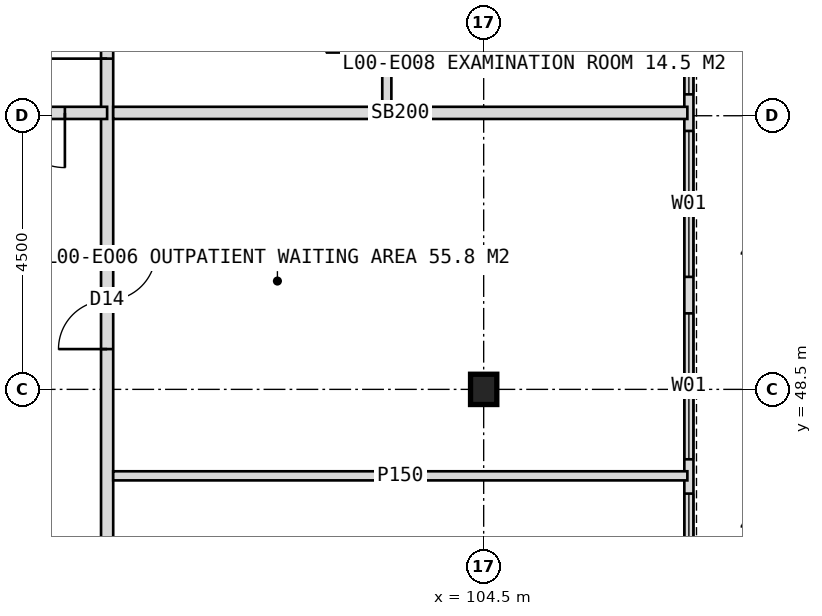
"""IFC4 building model, lengths in metres.
Left out: names, types, materials, properties, quantities, classifications, styles, units other than length and angle.
Written with IfcOpenShell. Run it as: python <this file> out.ifc"""

import sys

from ifc_helpers import new_model, si_unit, direction, frame, frame_2d, origin, origin_2d, place, context, subcontext, project, spatial, rectangle, i_section, extrude, element, fill, save


model = new_model("IFC4")
c1 = context("Model", 3, precision=1e-05, world=origin(), true_north=direction((0.0, 1.0)))
c2 = subcontext(c1, "Body", "Model", "MODEL_VIEW")
j1 = project(units=[si_unit("LENGTHUNIT", "METRE"), si_unit("PLANEANGLEUNIT", "RADIAN")], contexts=[c1])
p1 = place(None, origin())
s1 = spatial("IfcSite", under=j1, at=p1, CompositionType="ELEMENT")
p2 = place(p1, origin())
s2 = spatial("IfcBuilding", under=s1, at=p2, CompositionType="ELEMENT")
p3 = place(p2, origin())
s3 = spatial("IfcBuildingStorey", under=s2, at=p3, CompositionType="ELEMENT", Elevation=0.0)
p4 = place(p3, frame((104.5, 48.5, 0.0), z_axis=(0.0, 0.0, 1.0), x_axis=(1.0, 0.0, 0.0)))
e1 = element("IfcColumn", 1, at=p4, inside=s3, PredefinedType="COLUMN", context=c2, shape_type="SweptSolid", body=[
    extrude(i_section(OverallWidth=0.432, OverallDepth=0.498, WebThickness=0.056, FlangeThickness=0.089, FilletRadius=0.015, at=origin_2d()), origin(), (0.0, 0.0, 1.0), 6.0),
])
p5 = place(p3, frame((107.875, 38.125, 0.0), z_axis=(0.0, 0.0, 1.0), x_axis=(0.0, 1.0, 0.0)))
e2 = element("IfcWall", 2, at=p5, inside=s3, PredefinedType="STANDARD", context=c2, shape_type="SweptSolid", body=[
    extrude(rectangle(XDim=47.75, YDim=0.15, at=frame_2d((23.875, 0.0))), origin(), (0.0, 0.0, 1.0), 6.0),
])
p6 = place(p5, frame((22.7, 0.0, 0.0)))
e3 = element("IfcOpeningElement", 3, at=p6, cuts=e2, PredefinedType="OPENING", context=c2, shape_type="SweptSolid", body=[
    extrude(rectangle(XDim=2.4, YDim=2.6, at=frame_2d((1.2, 1.3))), frame((0.0, 0.085, 0.0), z_axis=(0.0, -1.0, 0.0), x_axis=(1.0, 0.0, 0.0)), (0.0, 0.0, 1.0), 0.17),
])
p7 = place(p5, frame((0.33, 0.0, 0.6)))
e4 = element("IfcOpeningElement", 4, at=p7, cuts=e2, PredefinedType="OPENING", context=c2, shape_type="SweptSolid", body=[
    extrude(rectangle(XDim=2.4, YDim=3.0, at=frame_2d((1.2, 1.5))), frame((0.0, 0.085, 0.0), z_axis=(0.0, -1.0, 0.0), x_axis=(1.0, 0.0, 0.0)), (0.0, 0.0, 1.0), 0.17),
])
p8 = place(p5, frame((3.277, 0.0, 0.6)))
e5 = element("IfcOpeningElement", 5, at=p8, cuts=e2, PredefinedType="OPENING", context=c2, shape_type="SweptSolid", body=[
    extrude(rectangle(XDim=2.4, YDim=3.0, at=frame_2d((1.2, 1.5))), frame((0.0, 0.085, 0.0), z_axis=(0.0, -1.0, 0.0), x_axis=(1.0, 0.0, 0.0)), (0.0, 0.0, 1.0), 0.17),
])
p9 = place(p5, frame((6.261, 0.0, 0.6)))
e6 = element("IfcOpeningElement", 6, at=p9, cuts=e2, PredefinedType="OPENING", context=c2, shape_type="SweptSolid", body=[
    extrude(rectangle(XDim=2.4, YDim=3.0, at=frame_2d((1.2, 1.5))), frame((0.0, 0.085, 0.0), z_axis=(0.0, -1.0, 0.0), x_axis=(1.0, 0.0, 0.0)), (0.0, 0.0, 1.0), 0.17),
])
p10 = place(p5, frame((9.225, 0.0, 0.6)))
e7 = element("IfcOpeningElement", 7, at=p10, cuts=e2, PredefinedType="OPENING", context=c2, shape_type="SweptSolid", body=[
    extrude(rectangle(XDim=2.4, YDim=3.0, at=frame_2d((1.2, 1.5))), frame((0.0, 0.085, 0.0), z_axis=(0.0, -1.0, 0.0), x_axis=(1.0, 0.0, 0.0)), (0.0, 0.0, 1.0), 0.17),
])
p11 = place(p5, frame((12.225, 0.0, 0.6)))
e8 = element("IfcOpeningElement", 8, at=p11, cuts=e2, PredefinedType="OPENING", context=c2, shape_type="SweptSolid", body=[
    extrude(rectangle(XDim=2.4, YDim=3.0, at=frame_2d((1.2, 1.5))), frame((0.0, 0.085, 0.0), z_axis=(0.0, -1.0, 0.0), x_axis=(1.0, 0.0, 0.0)), (0.0, 0.0, 1.0), 0.17),
])
p12 = place(p5, frame((15.227, 0.0, 0.6)))
e9 = element("IfcOpeningElement", 9, at=p12, cuts=e2, PredefinedType="OPENING", context=c2, shape_type="SweptSolid", body=[
    extrude(rectangle(XDim=2.4, YDim=3.0, at=frame_2d((1.2, 1.5))), frame((0.0, 0.085, 0.0), z_axis=(0.0, -1.0, 0.0), x_axis=(1.0, 0.0, 0.0)), (0.0, 0.0, 1.0), 0.17),
])
p13 = place(p5, frame((18.198, 0.0, 0.6)))
e10 = element("IfcOpeningElement", 10, at=p13, cuts=e2, PredefinedType="OPENING", context=c2, shape_type="SweptSolid", body=[
    extrude(rectangle(XDim=2.4, YDim=3.0, at=frame_2d((1.2, 1.5))), frame((0.0, 0.085, 0.0), z_axis=(0.0, -1.0, 0.0), x_axis=(1.0, 0.0, 0.0)), (0.0, 0.0, 1.0), 0.17),
])
p14 = place(p5, frame((27.152, 0.0, 0.6)))
e11 = element("IfcOpeningElement", 11, at=p14, cuts=e2, PredefinedType="OPENING", context=c2, shape_type="SweptSolid", body=[
    extrude(rectangle(XDim=2.4, YDim=3.0, at=frame_2d((1.2, 1.5))), frame((0.0, 0.085, 0.0), z_axis=(0.0, -1.0, 0.0), x_axis=(1.0, 0.0, 0.0)), (0.0, 0.0, 1.0), 0.17),
])
p15 = place(p5, frame((30.136, 0.0, 0.6)))
e12 = element("IfcOpeningElement", 12, at=p15, cuts=e2, PredefinedType="OPENING", context=c2, shape_type="SweptSolid", body=[
    extrude(rectangle(XDim=2.4, YDim=3.0, at=frame_2d((1.2, 1.5))), frame((0.0, 0.085, 0.0), z_axis=(0.0, -1.0, 0.0), x_axis=(1.0, 0.0, 0.0)), (0.0, 0.0, 1.0), 0.17),
])
p16 = place(p5, frame((33.12, 0.0, 0.6)))
e13 = element("IfcOpeningElement", 13, at=p16, cuts=e2, PredefinedType="OPENING", context=c2, shape_type="SweptSolid", body=[
    extrude(rectangle(XDim=2.4, YDim=3.0, at=frame_2d((1.2, 1.5))), frame((0.0, 0.085, 0.0), z_axis=(0.0, -1.0, 0.0), x_axis=(1.0, 0.0, 0.0)), (0.0, 0.0, 1.0), 0.17),
])
p17 = place(p5, frame((36.044, 0.0, 0.6)))
e14 = element("IfcOpeningElement", 14, at=p17, cuts=e2, PredefinedType="OPENING", context=c2, shape_type="SweptSolid", body=[
    extrude(rectangle(XDim=2.4, YDim=3.0, at=frame_2d((1.2, 1.5))), frame((0.0, 0.085, 0.0), z_axis=(0.0, -1.0, 0.0), x_axis=(1.0, 0.0, 0.0)), (0.0, 0.0, 1.0), 0.17),
])
p18 = place(p5, frame((39.044, 0.0, 0.6)))
e15 = element("IfcOpeningElement", 15, at=p18, cuts=e2, PredefinedType="OPENING", context=c2, shape_type="SweptSolid", body=[
    extrude(rectangle(XDim=2.4, YDim=3.0, at=frame_2d((1.2, 1.5))), frame((0.0, 0.085, 0.0), z_axis=(0.0, -1.0, 0.0), x_axis=(1.0, 0.0, 0.0)), (0.0, 0.0, 1.0), 0.17),
])
p19 = place(p5, frame((42.044, 0.0, 0.6)))
e16 = element("IfcOpeningElement", 16, at=p19, cuts=e2, PredefinedType="OPENING", context=c2, shape_type="SweptSolid", body=[
    extrude(rectangle(XDim=2.4, YDim=3.0, at=frame_2d((1.2, 1.5))), frame((0.0, 0.085, 0.0), z_axis=(0.0, -1.0, 0.0), x_axis=(1.0, 0.0, 0.0)), (0.0, 0.0, 1.0), 0.17),
])
p20 = place(p5, frame((45.044, 0.0, 0.6)))
e17 = element("IfcOpeningElement", 17, at=p20, cuts=e2, PredefinedType="OPENING", context=c2, shape_type="SweptSolid", body=[
    extrude(rectangle(XDim=2.4, YDim=3.0, at=frame_2d((1.2, 1.5))), frame((0.0, 0.085, 0.0), z_axis=(0.0, -1.0, 0.0), x_axis=(1.0, 0.0, 0.0)), (0.0, 0.0, 1.0), 0.17),
])
p21 = place(p3, frame((98.307, 38.15, 0.0), z_axis=(0.0, 0.0, 1.0), x_axis=(0.0, 1.0, 0.0)))
e18 = element("IfcWall", 18, at=p21, inside=s3, PredefinedType="PARTITIONING", context=c2, shape_type="SweptSolid", body=[
    extrude(rectangle(XDim=47.7, YDim=0.2, at=frame_2d((23.85, 0.0))), origin(), (0.0, 0.0, 1.0), 5.7),
])
p22 = place(p21, frame((45.7, 0.0, 0.0)))
e19 = element("IfcOpeningElement", 19, at=p22, cuts=e18, PredefinedType="OPENING", context=c2, shape_type="SweptSolid", body=[
    extrude(rectangle(XDim=1.2, YDim=2.1, at=frame_2d((0.6, 1.05))), frame((0.0, 0.11, 0.0), z_axis=(0.0, -1.0, 0.0), x_axis=(1.0, 0.0, 0.0)), (0.0, 0.0, 1.0), 0.22),
])
p23 = place(p21, frame((36.244, 0.0, 0.0)))
e20 = element("IfcOpeningElement", 20, at=p23, cuts=e18, PredefinedType="OPENING", context=c2, shape_type="SweptSolid", body=[
    extrude(rectangle(XDim=1.0, YDim=2.1, at=frame_2d((0.5, 1.05))), frame((0.0, 0.11, 0.0), z_axis=(0.0, -1.0, 0.0), x_axis=(1.0, 0.0, 0.0)), (0.0, 0.0, 1.0), 0.22),
])
p24 = place(p21, frame((0.93, 0.0, 0.0)))
e21 = element("IfcOpeningElement", 21, at=p24, cuts=e18, PredefinedType="OPENING", context=c2, shape_type="SweptSolid", body=[
    extrude(rectangle(XDim=1.0, YDim=2.1, at=frame_2d((0.5, 1.05))), frame((0.0, 0.11, 0.0), z_axis=(0.0, -1.0, 0.0), x_axis=(1.0, 0.0, 0.0)), (0.0, 0.0, 1.0), 0.22),
])
p25 = place(p21, frame((3.852, 0.0, 0.0)))
e22 = element("IfcOpeningElement", 22, at=p25, cuts=e18, PredefinedType="OPENING", context=c2, shape_type="SweptSolid", body=[
    extrude(rectangle(XDim=1.0, YDim=2.1, at=frame_2d((0.5, 1.05))), frame((0.0, 0.11, 0.0), z_axis=(0.0, -1.0, 0.0), x_axis=(1.0, 0.0, 0.0)), (0.0, 0.0, 1.0), 0.22),
])
p26 = place(p21, frame((6.836, 0.0, 0.0)))
e23 = element("IfcOpeningElement", 23, at=p26, cuts=e18, PredefinedType="OPENING", context=c2, shape_type="SweptSolid", body=[
    extrude(rectangle(XDim=1.0, YDim=2.1, at=frame_2d((0.5, 1.05))), frame((0.0, 0.11, 0.0), z_axis=(0.0, -1.0, 0.0), x_axis=(1.0, 0.0, 0.0)), (0.0, 0.0, 1.0), 0.22),
])
p27 = place(p21, frame((11.012, 0.0, 0.0)))
e24 = element("IfcOpeningElement", 24, at=p27, cuts=e18, PredefinedType="OPENING", context=c2, shape_type="SweptSolid", body=[
    extrude(rectangle(XDim=1.6, YDim=2.2, at=frame_2d((0.8, 1.1))), frame((0.0, 0.11, 0.0), z_axis=(0.0, -1.0, 0.0), x_axis=(1.0, 0.0, 0.0)), (0.0, 0.0, 1.0), 0.22),
])
p28 = place(p21, frame((15.789, 0.0, 0.0)))
e25 = element("IfcOpeningElement", 25, at=p28, cuts=e18, PredefinedType="OPENING", context=c2, shape_type="SweptSolid", body=[
    extrude(rectangle(XDim=1.0, YDim=2.1, at=frame_2d((0.5, 1.05))), frame((0.0, 0.11, 0.0), z_axis=(0.0, -1.0, 0.0), x_axis=(1.0, 0.0, 0.0)), (0.0, 0.0, 1.0), 0.22),
])
p29 = place(p21, frame((18.773, 0.0, 0.0)))
e26 = element("IfcOpeningElement", 26, at=p29, cuts=e18, PredefinedType="OPENING", context=c2, shape_type="SweptSolid", body=[
    extrude(rectangle(XDim=1.0, YDim=2.1, at=frame_2d((0.5, 1.05))), frame((0.0, 0.11, 0.0), z_axis=(0.0, -1.0, 0.0), x_axis=(1.0, 0.0, 0.0)), (0.0, 0.0, 1.0), 0.22),
])
p30 = place(p21, frame((22.95, 0.0, 0.0)))
e27 = element("IfcOpeningElement", 27, at=p30, cuts=e18, PredefinedType="OPENING", context=c2, shape_type="SweptSolid", body=[
    extrude(rectangle(XDim=1.6, YDim=2.2, at=frame_2d((0.8, 1.1))), frame((0.0, 0.11, 0.0), z_axis=(0.0, -1.0, 0.0), x_axis=(1.0, 0.0, 0.0)), (0.0, 0.0, 1.0), 0.22),
])
p31 = place(p21, frame((27.727, 0.0, 0.0)))
e28 = element("IfcOpeningElement", 28, at=p31, cuts=e18, PredefinedType="OPENING", context=c2, shape_type="SweptSolid", body=[
    extrude(rectangle(XDim=1.0, YDim=2.1, at=frame_2d((0.5, 1.05))), frame((0.0, 0.11, 0.0), z_axis=(0.0, -1.0, 0.0), x_axis=(1.0, 0.0, 0.0)), (0.0, 0.0, 1.0), 0.22),
])
p32 = place(p21, frame((30.711, 0.0, 0.0)))
e29 = element("IfcOpeningElement", 29, at=p32, cuts=e18, PredefinedType="OPENING", context=c2, shape_type="SweptSolid", body=[
    extrude(rectangle(XDim=1.0, YDim=2.1, at=frame_2d((0.5, 1.05))), frame((0.0, 0.11, 0.0), z_axis=(0.0, -1.0, 0.0), x_axis=(1.0, 0.0, 0.0)), (0.0, 0.0, 1.0), 0.22),
])
p33 = place(p21, frame((33.695, 0.0, 0.0)))
e30 = element("IfcOpeningElement", 30, at=p33, cuts=e18, PredefinedType="OPENING", context=c2, shape_type="SweptSolid", body=[
    extrude(rectangle(XDim=1.0, YDim=2.1, at=frame_2d((0.5, 1.05))), frame((0.0, 0.11, 0.0), z_axis=(0.0, -1.0, 0.0), x_axis=(1.0, 0.0, 0.0)), (0.0, 0.0, 1.0), 0.22),
])
p34 = place(p3, frame((98.307, 53.047, 0.0), z_axis=(0.0, 0.0, 1.0), x_axis=(-1.0, 0.0, 0.0)))
e31 = element("IfcWall", 31, at=p34, inside=s3, PredefinedType="SOLIDWALL", context=c2, shape_type="SweptSolid", body=[
    extrude(rectangle(XDim=3.189, YDim=0.2, at=frame_2d((1.594, 0.0))), origin(), (0.0, 0.0, 1.0), 5.7),
])
p35 = place(p34, frame((0.695, 0.0, 0.0)))
e32 = element("IfcOpeningElement", 32, at=p35, cuts=e31, PredefinedType="OPENING", context=c2, shape_type="SweptSolid", body=[
    extrude(rectangle(XDim=1.8, YDim=2.2, at=frame_2d((0.9, 1.1))), frame((0.0, 0.11, 0.0), z_axis=(0.0, -1.0, 0.0), x_axis=(1.0, 0.0, 0.0)), (0.0, 0.0, 1.0), 0.22),
])
p36 = place(p3, frame((107.85, 47.078, 0.0), z_axis=(0.0, 0.0, 1.0), x_axis=(-1.0, 0.0, 0.0)))
e33 = element("IfcWall", 33, at=p36, inside=s3, PredefinedType="PARTITIONING", context=c2, shape_type="SweptSolid", body=[
    extrude(rectangle(XDim=9.443, YDim=0.15, at=frame_2d((4.722, 0.0))), origin(), (0.0, 0.0, 1.0), 5.7),
])
p37 = place(p3, frame((107.85, 53.047, 0.0), z_axis=(0.0, 0.0, 1.0), x_axis=(-1.0, 0.0, 0.0)))
e34 = element("IfcWall", 34, at=p37, inside=s3, PredefinedType="SOLIDWALL", context=c2, shape_type="SweptSolid", body=[
    extrude(rectangle(XDim=9.443, YDim=0.2, at=frame_2d((4.722, 0.0))), origin(), (0.0, 0.0, 1.0), 5.7),
])
p38 = place(p3, frame((102.907, 53.047, 0.0), z_axis=(0.0, 0.0, 1.0), x_axis=(0.0, 1.0, 0.0)))
e35 = element("IfcWall", 35, at=p38, inside=s3, PredefinedType="PARTITIONING", context=c2, shape_type="SweptSolid", body=[
    extrude(rectangle(XDim=5.969, YDim=0.15, at=frame_2d((2.984, 0.0))), origin(), (0.0, 0.0, 1.0), 5.7),
])
p39 = place(p38, frame((0.992, 0.0, 0.0)))
e36 = element("IfcOpeningElement", 36, at=p39, cuts=e35, PredefinedType="OPENING", context=c2, shape_type="SweptSolid", body=[
    extrude(rectangle(XDim=1.0, YDim=2.1, at=frame_2d((0.5, 1.05))), frame((0.0, 0.085, 0.0), z_axis=(0.0, -1.0, 0.0), x_axis=(1.0, 0.0, 0.0)), (0.0, 0.0, 1.0), 0.17),
])
p40 = place(p38, frame((3.977, 0.0, 0.0)))
e37 = element("IfcOpeningElement", 37, at=p40, cuts=e35, PredefinedType="OPENING", context=c2, shape_type="SweptSolid", body=[
    extrude(rectangle(XDim=1.0, YDim=2.1, at=frame_2d((0.5, 1.05))), frame((0.0, 0.085, 0.0), z_axis=(0.0, -1.0, 0.0), x_axis=(1.0, 0.0, 0.0)), (0.0, 0.0, 1.0), 0.17),
])
p41 = place(p9, origin())
e38 = element("IfcWindow", 38, at=p41, inside=s3, PartitioningType="SINGLE_PANEL", PredefinedType="WINDOW", context=c2, shape_type="SweptSolid", body=[
    extrude(rectangle(XDim=2.4, YDim=3.0, at=frame_2d((1.2, 1.5))), frame((0.0, 0.03, 0.0), z_axis=(0.0, -1.0, 0.0), x_axis=(1.0, 0.0, 0.0)), (0.0, 0.0, 1.0), 0.06),
])
fill(e6, e38)
p42 = place(p10, origin())
e39 = element("IfcWindow", 39, at=p42, inside=s3, PartitioningType="SINGLE_PANEL", PredefinedType="WINDOW", context=c2, shape_type="SweptSolid", body=[
    extrude(rectangle(XDim=2.4, YDim=3.0, at=frame_2d((1.2, 1.5))), frame((0.0, 0.03, 0.0), z_axis=(0.0, -1.0, 0.0), x_axis=(1.0, 0.0, 0.0)), (0.0, 0.0, 1.0), 0.06),
])
fill(e7, e39)
p43 = place(p11, origin())
e40 = element("IfcWindow", 40, at=p43, inside=s3, PartitioningType="SINGLE_PANEL", PredefinedType="WINDOW", context=c2, shape_type="SweptSolid", body=[
    extrude(rectangle(XDim=2.4, YDim=3.0, at=frame_2d((1.2, 1.5))), frame((0.0, 0.03, 0.0), z_axis=(0.0, -1.0, 0.0), x_axis=(1.0, 0.0, 0.0)), (0.0, 0.0, 1.0), 0.06),
])
fill(e8, e40)
p44 = place(p12, origin())
e41 = element("IfcWindow", 41, at=p44, inside=s3, PartitioningType="SINGLE_PANEL", PredefinedType="WINDOW", context=c2, shape_type="SweptSolid", body=[
    extrude(rectangle(XDim=2.4, YDim=3.0, at=frame_2d((1.2, 1.5))), frame((0.0, 0.03, 0.0), z_axis=(0.0, -1.0, 0.0), x_axis=(1.0, 0.0, 0.0)), (0.0, 0.0, 1.0), 0.06),
])
fill(e9, e41)
p45 = place(p35, origin())
e42 = element("IfcDoor", 42, at=p45, inside=s3, OperationType="DOUBLE_DOOR_DOUBLE_SWING", PredefinedType="DOOR", context=c2, shape_type="SweptSolid", body=[
    extrude(rectangle(XDim=1.8, YDim=2.2, at=frame_2d((0.9, 1.1))), frame((0.0, 0.025, 0.0), z_axis=(0.0, -1.0, 0.0), x_axis=(1.0, 0.0, 0.0)), (0.0, 0.0, 1.0), 0.05),
])
fill(e32, e42)
p46 = place(p27, origin())
e43 = element("IfcDoor", 43, at=p46, inside=s3, OperationType="DOUBLE_DOOR_DOUBLE_SWING", PredefinedType="DOOR", context=c2, shape_type="SweptSolid", body=[
    extrude(rectangle(XDim=1.6, YDim=2.2, at=frame_2d((0.8, 1.1))), frame((0.0, 0.025, 0.0), z_axis=(0.0, -1.0, 0.0), x_axis=(1.0, 0.0, 0.0)), (0.0, 0.0, 1.0), 0.05),
])
fill(e24, e43)
p47 = place(p28, origin())
e44 = element("IfcDoor", 44, at=p47, inside=s3, OperationType="SINGLE_SWING_LEFT", PredefinedType="DOOR", context=c2, shape_type="SweptSolid", body=[
    extrude(rectangle(XDim=1.0, YDim=2.1, at=frame_2d((0.5, 1.05))), frame((0.0, 0.025, 0.0), z_axis=(0.0, -1.0, 0.0), x_axis=(1.0, 0.0, 0.0)), (0.0, 0.0, 1.0), 0.05),
])
fill(e25, e44)
p48 = place(p39, origin())
e45 = element("IfcDoor", 45, at=p48, inside=s3, OperationType="SINGLE_SWING_LEFT", PredefinedType="DOOR", context=c2, shape_type="SweptSolid", body=[
    extrude(rectangle(XDim=1.0, YDim=2.1, at=frame_2d((0.5, 1.05))), frame((0.0, 0.025, 0.0), z_axis=(0.0, -1.0, 0.0), x_axis=(1.0, 0.0, 0.0)), (0.0, 0.0, 1.0), 0.05),
])
fill(e36, e45)
save(model, sys.argv[1])
